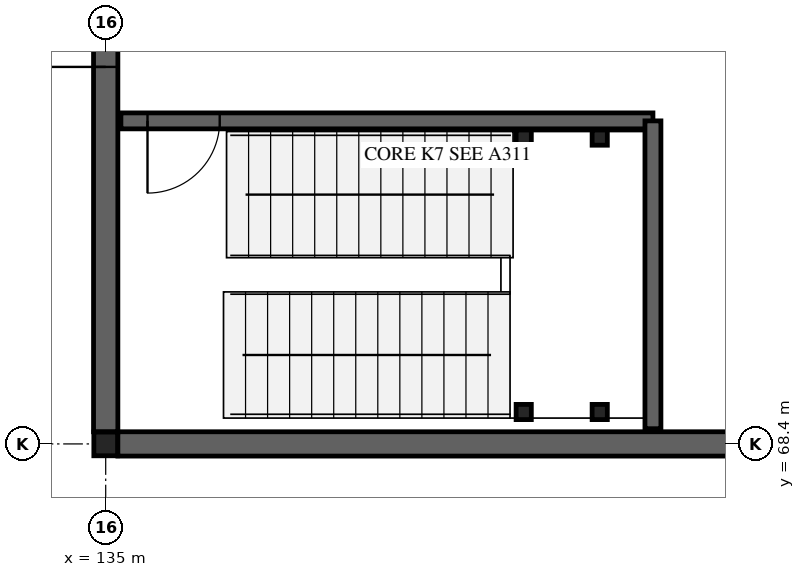
"""IFC4 building model, lengths in metres.
Left out: names, types, materials, properties, quantities, classifications, styles, units other than length and angle.
Written with IfcOpenShell. Run it as: python <this file> out.ifc"""

import sys

from ifc_helpers import new_model, si_unit, direction, frame, frame_2d, origin, origin_2d, place, context, subcontext, project, spatial, rectangle, hollow_rectangle, i_section, extrude, element, fill, save


model = new_model("IFC4")
c1 = context("Model", 3, precision=1e-05, world=origin(), true_north=direction((0.0, 1.0)))
c2 = subcontext(c1, "Body", "Model", "MODEL_VIEW")
j1 = project(units=[si_unit("LENGTHUNIT", "METRE"), si_unit("PLANEANGLEUNIT", "RADIAN")], contexts=[c1])
p1 = place(None, origin())
s1 = spatial("IfcSite", under=j1, at=p1, CompositionType="ELEMENT")
p2 = place(p1, origin())
s2 = spatial("IfcBuilding", under=s1, at=p2, CompositionType="ELEMENT")
p3 = place(p2, origin())
s3 = spatial("IfcBuildingStorey", under=s2, at=p3, CompositionType="ELEMENT", Elevation=0.0)
p4 = place(p3, frame((135.0, 68.4, 0.0), z_axis=(0.0, 0.0, 1.0), x_axis=(1.0, 0.0, 0.0)))
e1 = element("IfcColumn", 1, at=p4, inside=s3, PredefinedType="COLUMN", context=c2, shape_type="SweptSolid", body=[
    extrude(i_section(OverallWidth=0.312, OverallDepth=0.312, WebThickness=0.017, FlangeThickness=0.017, FilletRadius=0.015, at=origin_2d()), origin(), (0.0, 0.0, 1.0), 5.04),
])
p5 = place(p3, frame((135.16, 68.4, 0.0), z_axis=(0.0, 0.0, 1.0), x_axis=(1.0, 0.0, 0.0)))
e2 = element("IfcWall", 2, at=p5, inside=s3, PredefinedType="SHEAR", context=c2, shape_type="SweptSolid", body=[
    extrude(rectangle(XDim=8.68, YDim=0.32, at=frame_2d((4.34, 0.0))), origin(), (0.0, 0.0, 1.0), 4.76),
])
p6 = place(p3, frame((135.0, 68.56, 0.0), z_axis=(0.0, 0.0, 1.0), x_axis=(0.0, 1.0, 0.0)))
e3 = element("IfcWall", 3, at=p6, inside=s3, PredefinedType="SHEAR", context=c2, shape_type="SweptSolid", body=[
    extrude(rectangle(XDim=7.28, YDim=0.32, at=frame_2d((3.64, 0.0))), origin(), (0.0, 0.0, 1.0), 4.76),
])
p7 = place(p6, frame((4.8, 0.0, 0.0)))
e4 = element("IfcOpeningElement", 4, at=p7, cuts=e3, PredefinedType="OPENING", context=c2, shape_type="SweptSolid", body=[
    extrude(rectangle(XDim=1.0, YDim=2.15, at=frame_2d((0.5, 1.075))), frame((0.0, 0.17, 0.0), z_axis=(0.0, -1.0, 0.0), x_axis=(1.0, 0.0, 0.0)), (0.0, 0.0, 1.0), 0.34),
])
p8 = place(p3, frame((135.2, 72.65, 0.0), z_axis=(0.0, 0.0, 1.0), x_axis=(1.0, 0.0, 0.0)))
e5 = element("IfcWall", 5, at=p8, inside=s3, PredefinedType="SOLIDWALL", context=c2, shape_type="SweptSolid", body=[
    extrude(rectangle(XDim=7.0, YDim=0.21, at=frame_2d((3.5, 0.0))), origin(), (0.0, 0.0, 1.0), 4.76),
])
p9 = place(p8, frame((0.35, 0.0, 0.0)))
e6 = element("IfcOpeningElement", 6, at=p9, cuts=e5, PredefinedType="OPENING", context=c2, shape_type="SweptSolid", body=[
    extrude(rectangle(XDim=0.95, YDim=2.12, at=frame_2d((0.475, 1.06))), frame((0.0, 0.115, 0.0), z_axis=(0.0, -1.0, 0.0), x_axis=(1.0, 0.0, 0.0)), (0.0, 0.0, 1.0), 0.23),
])
p10 = place(p3, frame((142.2, 68.6, 0.0), z_axis=(0.0, 0.0, 1.0), x_axis=(0.0, 1.0, 0.0)))
e7 = element("IfcWall", 7, at=p10, inside=s3, PredefinedType="SOLIDWALL", context=c2, shape_type="SweptSolid", body=[
    extrude(rectangle(XDim=4.05, YDim=0.21, at=frame_2d((2.025, 0.0))), origin(), (0.0, 0.0, 1.0), 4.76),
])
for number, where, z_axis, x_axis in (
    (8, (140.5, 68.82, 0.0), (0.0, 0.0, 1.0), (1.0, 0.0, 0.0)),
    (9, (140.5, 72.43, 0.0), (0.0, 0.0, 1.0), (1.0, 0.0, 0.0)),
    (10, (141.5, 68.82, 0.0), (0.0, 0.0, 1.0), (1.0, 0.0, 0.0)),
    (11, (141.5, 72.43, 0.0), (0.0, 0.0, 1.0), (1.0, 0.0, 0.0)),
):
    element("IfcColumn", number, at=place(p3, frame(where, z_axis=z_axis, x_axis=x_axis)), inside=s3, PredefinedType="COLUMN", context=c2, shape_type="SweptSolid", body=[
        extrude(hollow_rectangle(XDim=0.2, YDim=0.2, WallThickness=0.012, at=origin_2d()), origin(), (0.0, 0.0, 1.0), 5.04),
    ])
p11 = place(p9, origin())
e12 = element("IfcDoor", 12, at=p11, inside=s3, OperationType="SINGLE_SWING_RIGHT", PredefinedType="DOOR", context=c2, shape_type="SweptSolid", body=[
    extrude(rectangle(XDim=0.95, YDim=2.12, at=frame_2d((0.475, 1.06))), frame((0.0, 0.025, 0.0), z_axis=(0.0, -1.0, 0.0), x_axis=(1.0, 0.0, 0.0)), (0.0, 0.0, 1.0), 0.05),
])
fill(e6, e12)
p12 = place(p7, origin())
e13 = element("IfcDoor", 13, at=p12, inside=s3, OperationType="SINGLE_SWING_LEFT", PredefinedType="DOOR", context=c2, shape_type="SweptSolid", body=[
    extrude(rectangle(XDim=1.0, YDim=2.15, at=frame_2d((0.5, 1.075))), frame((0.0, 0.025, 0.0), z_axis=(0.0, -1.0, 0.0), x_axis=(1.0, 0.0, 0.0)), (0.0, 0.0, 1.0), 0.05),
])
fill(e4, e13)
save(model, sys.argv[1])
